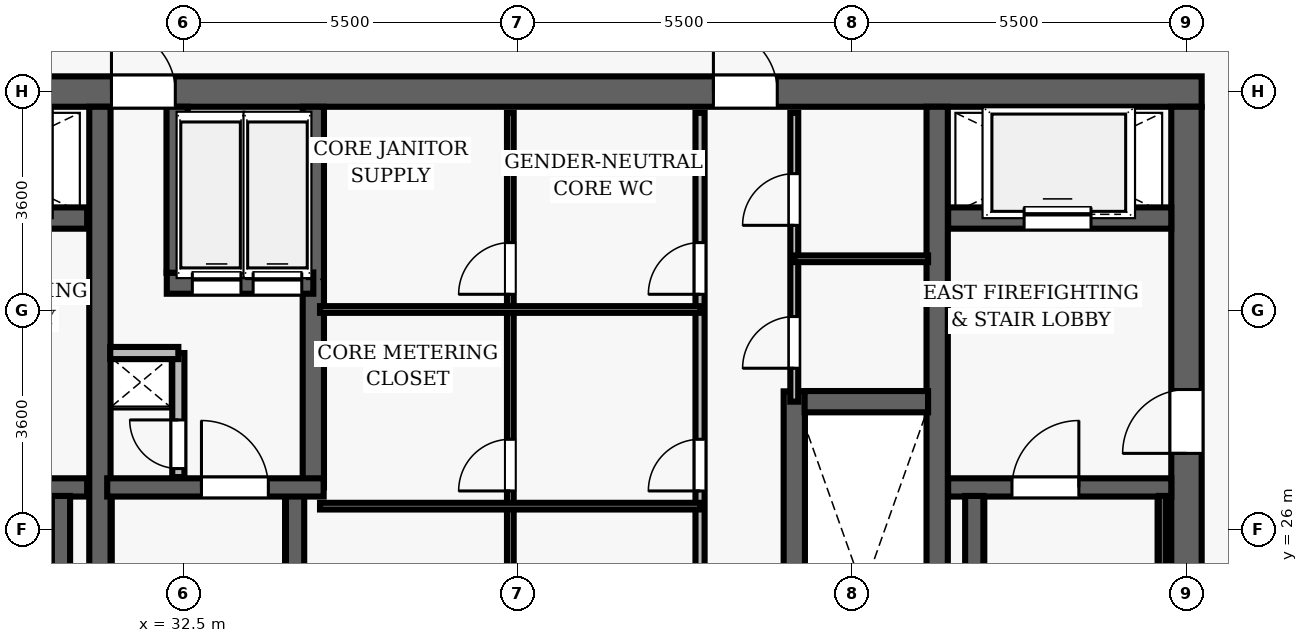
"""IFC4 building model, lengths in metres.
Left out: names, types, materials, properties, quantities, classifications, styles, units other than length and angle.
Written with IfcOpenShell. Run it as: python <this file> out.ifc"""

import sys

from ifc_helpers import new_model, si_unit, direction, frame, frame_2d, origin, place, context, subcontext, project, spatial, rectangle, extrude, element, fill, save


model = new_model("IFC4")
c1 = context("Model", 3, precision=1e-05, world=origin(), true_north=direction((0.0, 1.0)))
c2 = subcontext(c1, "Body", "Model", "MODEL_VIEW")
j1 = project(units=[si_unit("LENGTHUNIT", "METRE"), si_unit("PLANEANGLEUNIT", "RADIAN")], contexts=[c1])
p1 = place(None, origin())
s1 = spatial("IfcSite", under=j1, at=p1, CompositionType="ELEMENT")
p2 = place(p1, origin())
s2 = spatial("IfcBuilding", under=s1, at=p2, CompositionType="ELEMENT")
p3 = place(p2, frame((0.0, 0.0, 178.9)))
s3 = spatial("IfcBuildingStorey", under=s2, at=p3, CompositionType="ELEMENT", Elevation=178.9)
p4 = place(p3, frame((26.75, 33.2, 0.0), z_axis=(0.0, 0.0, 1.0), x_axis=(1.0, 0.0, 0.0)))
e1 = element("IfcWall", 1, at=p4, inside=s3, PredefinedType="SHEAR", context=c2, shape_type="SweptSolid", body=[
    extrude(rectangle(XDim=22.5, YDim=0.5, at=frame_2d((11.25, 0.0))), origin(), (0.0, 0.0, 1.0), 3.85),
])
p5 = place(p4, frame((4.57, 0.0, 0.0)))
e2 = element("IfcOpeningElement", 2, at=p5, cuts=e1, PredefinedType="OPENING", context=c2, shape_type="SweptSolid", body=[
    extrude(rectangle(XDim=1.05, YDim=2.15, at=frame_2d((0.525, 1.075))), frame((0.0, 0.26, 0.0), z_axis=(0.0, -1.0, 0.0), x_axis=(1.0, 0.0, 0.0)), (0.0, 0.0, 1.0), 0.52),
])
p6 = place(p4, frame((14.47, 0.0, 0.0)))
e3 = element("IfcOpeningElement", 3, at=p6, cuts=e1, PredefinedType="OPENING", context=c2, shape_type="SweptSolid", body=[
    extrude(rectangle(XDim=1.05, YDim=2.15, at=frame_2d((0.525, 1.075))), frame((0.0, 0.26, 0.0), z_axis=(0.0, -1.0, 0.0), x_axis=(1.0, 0.0, 0.0)), (0.0, 0.0, 1.0), 0.52),
])
p7 = place(p3, frame((49.0, 19.05, 0.0), z_axis=(0.0, 0.0, 1.0), x_axis=(0.0, 1.0, 0.0)))
e4 = element("IfcWall", 4, at=p7, inside=s3, PredefinedType="SHEAR", context=c2, shape_type="SweptSolid", body=[
    extrude(rectangle(XDim=13.9, YDim=0.5, at=frame_2d((6.95, 0.0))), origin(), (0.0, 0.0, 1.0), 3.85),
])
p8 = place(p7, frame((8.2, 0.0, 0.0)))
e5 = element("IfcOpeningElement", 5, at=p8, cuts=e4, PredefinedType="OPENING", context=c2, shape_type="SweptSolid", body=[
    extrude(rectangle(XDim=1.05, YDim=2.15, at=frame_2d((0.525, 1.075))), frame((0.0, 0.26, 0.0), z_axis=(0.0, -1.0, 0.0), x_axis=(1.0, 0.0, 0.0)), (0.0, 0.0, 1.0), 0.52),
])
for number, where, z_axis, x_axis in (
    (6, (31.13, 19.05, 0.0), (0.0, 0.0, 1.0), (0.0, 1.0, 0.0)),
    (7, (44.9, 19.05, 0.0), (0.0, 0.0, 1.0), (0.0, 1.0, 0.0)),
):
    element("IfcWall", number, at=place(p3, frame(where, z_axis=z_axis, x_axis=x_axis)), inside=s3, PredefinedType="SHEAR", context=c2, shape_type="SweptSolid", body=[
        extrude(rectangle(XDim=13.9, YDim=0.35, at=frame_2d((6.95, 0.0))), origin(), (0.0, 0.0, 1.0), 3.85),
    ])
p9 = place(p3, frame((27.25, 26.69, 0.0), z_axis=(0.0, 0.0, 1.0), x_axis=(1.0, 0.0, 0.0)))
e8 = element("IfcWall", 8, at=p9, inside=s3, PredefinedType="SHEAR", context=c2, shape_type="SweptSolid", body=[
    extrude(rectangle(XDim=3.67, YDim=0.3, at=frame_2d((1.835, 0.0))), origin(), (0.0, 0.0, 1.0), 3.85),
])
p10 = place(p9, frame((1.05, 0.0, 0.0)))
e9 = element("IfcOpeningElement", 9, at=p10, cuts=e8, PredefinedType="OPENING", context=c2, shape_type="SweptSolid", body=[
    extrude(rectangle(XDim=1.1, YDim=2.15, at=frame_2d((0.55, 1.075))), frame((0.0, 0.16, 0.0), z_axis=(0.0, -1.0, 0.0), x_axis=(1.0, 0.0, 0.0)), (0.0, 0.0, 1.0), 0.32),
])
p11 = place(p3, frame((30.49, 19.05, 0.0), z_axis=(0.0, 0.0, 1.0), x_axis=(0.0, 1.0, 0.0)))
e10 = element("IfcWall", 10, at=p11, inside=s3, PredefinedType="SHEAR", context=c2, shape_type="SweptSolid", body=[
    extrude(rectangle(XDim=7.5, YDim=0.3, at=frame_2d((3.75, 0.0))), origin(), (0.0, 0.0, 1.0), 3.85),
])
p12 = place(p3, frame((27.25, 31.12, 0.0), z_axis=(0.0, 0.0, 1.0), x_axis=(1.0, 0.0, 0.0)))
e11 = element("IfcWall", 11, at=p12, inside=s3, PredefinedType="SHEAR", context=c2, shape_type="SweptSolid", body=[
    extrude(rectangle(XDim=3.67, YDim=0.35, at=frame_2d((1.835, 0.0))), origin(), (0.0, 0.0, 1.0), 3.035),
])
p13 = place(p12, frame((1.25, 0.0, 0.0)))
e12 = element("IfcOpeningElement", 12, at=p13, cuts=e11, PredefinedType="OPENING", context=c2, shape_type="SweptSolid", body=[
    extrude(rectangle(XDim=1.1, YDim=2.15, at=frame_2d((0.55, 1.075))), frame((0.0, 0.185, 0.0), z_axis=(0.0, -1.0, 0.0), x_axis=(1.0, 0.0, 0.0)), (0.0, 0.0, 1.0), 0.37),
])
p14 = place(p3, frame((45.08, 26.69, 0.0), z_axis=(0.0, 0.0, 1.0), x_axis=(1.0, 0.0, 0.0)))
e13 = element("IfcWall", 13, at=p14, inside=s3, PredefinedType="SHEAR", context=c2, shape_type="SweptSolid", body=[
    extrude(rectangle(XDim=3.67, YDim=0.3, at=frame_2d((1.835, 0.0))), origin(), (0.0, 0.0, 1.0), 3.85),
])
p15 = place(p14, frame((1.05, 0.0, 0.0)))
e14 = element("IfcOpeningElement", 14, at=p15, cuts=e13, PredefinedType="OPENING", context=c2, shape_type="SweptSolid", body=[
    extrude(rectangle(XDim=1.1, YDim=2.15, at=frame_2d((0.55, 1.075))), frame((0.0, 0.16, 0.0), z_axis=(0.0, -1.0, 0.0), x_axis=(1.0, 0.0, 0.0)), (0.0, 0.0, 1.0), 0.32),
])
p16 = place(p3, frame((45.51, 19.05, 0.0), z_axis=(0.0, 0.0, 1.0), x_axis=(0.0, 1.0, 0.0)))
e15 = element("IfcWall", 15, at=p16, inside=s3, PredefinedType="SHEAR", context=c2, shape_type="SweptSolid", body=[
    extrude(rectangle(XDim=7.5, YDim=0.3, at=frame_2d((3.75, 0.0))), origin(), (0.0, 0.0, 1.0), 3.85),
])
p17 = place(p3, frame((48.605, 19.1, 0.0), z_axis=(0.0, 0.0, 1.0), x_axis=(0.0, 1.0, 0.0)))
e16 = element("IfcWall", 16, at=p17, inside=s3, PredefinedType="SHEAR", context=c2, shape_type="SweptSolid", body=[
    extrude(rectangle(XDim=7.45, YDim=0.12, at=frame_2d((3.725, 0.0))), origin(), (0.0, 0.0, 1.0), 3.85),
])
p18 = place(p3, frame((45.08, 31.12, 0.0), z_axis=(0.0, 0.0, 1.0), x_axis=(1.0, 0.0, 0.0)))
e17 = element("IfcWall", 17, at=p18, inside=s3, PredefinedType="SHEAR", context=c2, shape_type="SweptSolid", body=[
    extrude(rectangle(XDim=3.67, YDim=0.35, at=frame_2d((1.835, 0.0))), origin(), (0.0, 0.0, 1.0), 3.035),
])
p19 = place(p18, frame((1.25, 0.0, 0.0)))
e18 = element("IfcOpeningElement", 18, at=p19, cuts=e17, PredefinedType="OPENING", context=c2, shape_type="SweptSolid", body=[
    extrude(rectangle(XDim=1.1, YDim=2.15, at=frame_2d((0.55, 1.075))), frame((0.0, 0.185, 0.0), z_axis=(0.0, -1.0, 0.0), x_axis=(1.0, 0.0, 0.0)), (0.0, 0.0, 1.0), 0.37),
])
p20 = place(p3, frame((34.34, 19.05, 0.0), z_axis=(0.0, 0.0, 1.0), x_axis=(0.0, 1.0, 0.0)))
e19 = element("IfcWall", 19, at=p20, inside=s3, PredefinedType="SHEAR", context=c2, shape_type="SweptSolid", body=[
    extrude(rectangle(XDim=7.5, YDim=0.3, at=frame_2d((3.75, 0.0))), origin(), (0.0, 0.0, 1.0), 3.85),
])
p21 = place(p3, frame((34.64, 26.69, 0.0), z_axis=(0.0, 0.0, 1.0), x_axis=(0.0, 1.0, 0.0)))
e20 = element("IfcWall", 20, at=p21, inside=s3, PredefinedType="SHEAR", context=c2, shape_type="SweptSolid", body=[
    extrude(rectangle(XDim=6.26, YDim=0.35, at=frame_2d((3.13, 0.0))), origin(), (0.0, 0.0, 1.0), 3.85),
])
p22 = place(p3, frame((31.25, 26.69, 0.0), z_axis=(0.0, 0.0, 1.0), x_axis=(1.0, 0.0, 0.0)))
e21 = element("IfcWall", 21, at=p22, inside=s3, PredefinedType="SHEAR", context=c2, shape_type="SweptSolid", body=[
    extrude(rectangle(XDim=3.56, YDim=0.3, at=frame_2d((1.78, 0.0))), origin(), (0.0, 0.0, 1.0), 3.85),
])
p23 = place(p22, frame((1.55, 0.0, 0.0)))
e22 = element("IfcOpeningElement", 22, at=p23, cuts=e21, PredefinedType="OPENING", context=c2, shape_type="SweptSolid", body=[
    extrude(rectangle(XDim=1.1, YDim=2.15, at=frame_2d((0.55, 1.075))), frame((0.0, 0.16, 0.0), z_axis=(0.0, -1.0, 0.0), x_axis=(1.0, 0.0, 0.0)), (0.0, 0.0, 1.0), 0.32),
])
p24 = place(p3, frame((32.23, 30.05, 0.0), z_axis=(0.0, 0.0, 1.0), x_axis=(1.0, 0.0, 0.0)))
e23 = element("IfcWall", 23, at=p24, inside=s3, PredefinedType="SHEAR", context=c2, shape_type="SweptSolid", body=[
    extrude(rectangle(XDim=2.41, YDim=0.35, at=frame_2d((1.205, 0.0))), origin(), (0.0, 0.0, 1.0), 3.035),
])
p25 = place(p24, frame((0.42, 0.0, 0.0)))
e24 = element("IfcOpeningElement", 24, at=p25, cuts=e23, PredefinedType="OPENING", context=c2, shape_type="SweptSolid", body=[
    extrude(rectangle(XDim=0.8, YDim=2.15, at=frame_2d((0.4, 1.075))), frame((0.0, 0.185, 0.0), z_axis=(0.0, -1.0, 0.0), x_axis=(1.0, 0.0, 0.0)), (0.0, 0.0, 1.0), 0.37),
])
p26 = place(p24, frame((1.42, 0.0, 0.0)))
e25 = element("IfcOpeningElement", 25, at=p26, cuts=e23, PredefinedType="OPENING", context=c2, shape_type="SweptSolid", body=[
    extrude(rectangle(XDim=0.8, YDim=2.15, at=frame_2d((0.4, 1.075))), frame((0.0, 0.185, 0.0), z_axis=(0.0, -1.0, 0.0), x_axis=(1.0, 0.0, 0.0)), (0.0, 0.0, 1.0), 0.37),
])
p27 = place(p3, frame((32.4, 30.22, 0.0), z_axis=(0.0, 0.0, 1.0), x_axis=(0.0, 1.0, 0.0)))
e26 = element("IfcWall", 26, at=p27, inside=s3, PredefinedType="SHEAR", context=c2, shape_type="SweptSolid", body=[
    extrude(rectangle(XDim=2.73, YDim=0.35, at=frame_2d((1.365, 0.0))), origin(), (0.0, 0.0, 1.0), 3.035),
])
p28 = place(p3, frame((32.42, 26.86, 0.0), z_axis=(0.0, 0.0, 1.0), x_axis=(0.0, 1.0, 0.0)))
e27 = element("IfcWall", 27, at=p28, inside=s3, PredefinedType="PARTITIONING", context=c2, shape_type="SweptSolid", body=[
    extrude(rectangle(XDim=2.04, YDim=0.2, at=frame_2d((1.02, 0.0))), origin(), (0.0, 0.0, 1.0), 3.035),
])
p29 = place(p28, frame((0.14, 0.0, 0.0)))
e28 = element("IfcOpeningElement", 28, at=p29, cuts=e27, PredefinedType="OPENING", context=c2, shape_type="SweptSolid", body=[
    extrude(rectangle(XDim=0.8, YDim=2.05, at=frame_2d((0.4, 1.025))), frame((0.0, 0.11, 0.0), z_axis=(0.0, -1.0, 0.0), x_axis=(1.0, 0.0, 0.0)), (0.0, 0.0, 1.0), 0.22),
])
p30 = place(p3, frame((31.3, 28.9, 0.0), z_axis=(0.0, 0.0, 1.0), x_axis=(1.0, 0.0, 0.0)))
e29 = element("IfcWall", 29, at=p30, inside=s3, PredefinedType="PARTITIONING", context=c2, shape_type="SweptSolid", body=[
    extrude(rectangle(XDim=1.12, YDim=0.2, at=frame_2d((0.56, 0.0))), origin(), (0.0, 0.0, 1.0), 3.035),
])
p31 = place(p3, frame((42.55, 21.73, 0.0), z_axis=(0.0, 0.0, 1.0), x_axis=(0.0, 1.0, 0.0)))
e30 = element("IfcWall", 30, at=p31, inside=s3, PredefinedType="SHEAR", context=c2, shape_type="SweptSolid", body=[
    extrude(rectangle(XDim=6.54, YDim=0.35, at=frame_2d((3.27, 0.0))), origin(), (0.0, 0.0, 1.0), 3.035),
])
p32 = place(p3, frame((42.72, 28.1, 0.0), z_axis=(0.0, 0.0, 1.0), x_axis=(1.0, 0.0, 0.0)))
e31 = element("IfcWall", 31, at=p32, inside=s3, PredefinedType="SHEAR", context=c2, shape_type="SweptSolid", body=[
    extrude(rectangle(XDim=2.03, YDim=0.35, at=frame_2d((1.015, 0.0))), origin(), (0.0, 0.0, 1.0), 3.035),
])
p33 = place(p3, frame((41.0, 23.05, 0.0), z_axis=(0.0, 0.0, 1.0), x_axis=(0.0, 1.0, 0.0)))
e32 = element("IfcWall", 32, at=p33, inside=s3, PredefinedType="PARTITIONING", context=c2, shape_type="SweptSolid", body=[
    extrude(rectangle(XDim=9.8, YDim=0.15, at=frame_2d((4.9, 0.0))), origin(), (0.0, 0.0, 1.0), 3.035),
])
p34 = place(p33, frame((0.25, 0.0, 0.0)))
e33 = element("IfcOpeningElement", 33, at=p34, cuts=e32, PredefinedType="OPENING", context=c2, shape_type="SweptSolid", body=[
    extrude(rectangle(XDim=0.85, YDim=2.1, at=frame_2d((0.425, 1.05))), frame((0.0, 0.085, 0.0), z_axis=(0.0, -1.0, 0.0), x_axis=(1.0, 0.0, 0.0)), (0.0, 0.0, 1.0), 0.17),
])
p35 = place(p33, frame((3.582, 0.0, 0.0)))
e34 = element("IfcOpeningElement", 34, at=p35, cuts=e32, PredefinedType="OPENING", context=c2, shape_type="SweptSolid", body=[
    extrude(rectangle(XDim=0.85, YDim=2.1, at=frame_2d((0.425, 1.05))), frame((0.0, 0.085, 0.0), z_axis=(0.0, -1.0, 0.0), x_axis=(1.0, 0.0, 0.0)), (0.0, 0.0, 1.0), 0.17),
])
p36 = place(p33, frame((6.816, 0.0, 0.0)))
e35 = element("IfcOpeningElement", 35, at=p36, cuts=e32, PredefinedType="OPENING", context=c2, shape_type="SweptSolid", body=[
    extrude(rectangle(XDim=0.85, YDim=2.1, at=frame_2d((0.425, 1.05))), frame((0.0, 0.085, 0.0), z_axis=(0.0, -1.0, 0.0), x_axis=(1.0, 0.0, 0.0)), (0.0, 0.0, 1.0), 0.17),
])
p37 = place(p3, frame((37.88, 23.05, 0.0), z_axis=(0.0, 0.0, 1.0), x_axis=(0.0, 1.0, 0.0)))
e36 = element("IfcWall", 36, at=p37, inside=s3, PredefinedType="PARTITIONING", context=c2, shape_type="SweptSolid", body=[
    extrude(rectangle(XDim=9.8, YDim=0.11, at=frame_2d((4.9, 0.0))), origin(), (0.0, 0.0, 1.0), 3.035),
])
p38 = place(p37, frame((0.25, 0.0, 0.0)))
e37 = element("IfcOpeningElement", 37, at=p38, cuts=e36, PredefinedType="OPENING", context=c2, shape_type="SweptSolid", body=[
    extrude(rectangle(XDim=0.85, YDim=2.1, at=frame_2d((0.425, 1.05))), frame((0.0, 0.065, 0.0), z_axis=(0.0, -1.0, 0.0), x_axis=(1.0, 0.0, 0.0)), (0.0, 0.0, 1.0), 0.13),
])
p39 = place(p37, frame((3.582, 0.0, 0.0)))
e38 = element("IfcOpeningElement", 38, at=p39, cuts=e36, PredefinedType="OPENING", context=c2, shape_type="SweptSolid", body=[
    extrude(rectangle(XDim=0.85, YDim=2.1, at=frame_2d((0.425, 1.05))), frame((0.0, 0.065, 0.0), z_axis=(0.0, -1.0, 0.0), x_axis=(1.0, 0.0, 0.0)), (0.0, 0.0, 1.0), 0.13),
])
p40 = place(p37, frame((6.816, 0.0, 0.0)))
e39 = element("IfcOpeningElement", 39, at=p40, cuts=e36, PredefinedType="OPENING", context=c2, shape_type="SweptSolid", body=[
    extrude(rectangle(XDim=0.85, YDim=2.1, at=frame_2d((0.425, 1.05))), frame((0.0, 0.065, 0.0), z_axis=(0.0, -1.0, 0.0), x_axis=(1.0, 0.0, 0.0)), (0.0, 0.0, 1.0), 0.13),
])
for number, where, z_axis, x_axis in (
    (40, (34.75, 26.382, 0.0), (0.0, 0.0, 1.0), (1.0, 0.0, 0.0)),
    (41, (34.75, 29.616, 0.0), (0.0, 0.0, 1.0), (1.0, 0.0, 0.0)),
):
    element("IfcWall", number, at=place(p3, frame(where, z_axis=z_axis, x_axis=x_axis)), inside=s3, PredefinedType="PARTITIONING", context=c2, shape_type="SweptSolid", body=[
        extrude(rectangle(XDim=6.25, YDim=0.11, at=frame_2d((3.125, 0.0))), origin(), (0.0, 0.0, 1.0), 3.035),
    ])
p41 = place(p3, frame((42.55, 28.1, 0.0), z_axis=(0.0, 0.0, 1.0), x_axis=(0.0, 1.0, 0.0)))
e42 = element("IfcWall", 42, at=p41, inside=s3, PredefinedType="PARTITIONING", context=c2, shape_type="SweptSolid", body=[
    extrude(rectangle(XDim=4.75, YDim=0.13, at=frame_2d((2.375, 0.0))), origin(), (0.0, 0.0, 1.0), 3.035),
])
p42 = place(p41, frame((0.55, 0.0, 0.0)))
e43 = element("IfcOpeningElement", 43, at=p42, cuts=e42, PredefinedType="OPENING", context=c2, shape_type="SweptSolid", body=[
    extrude(rectangle(XDim=0.85, YDim=2.1, at=frame_2d((0.425, 1.05))), frame((0.0, 0.075, 0.0), z_axis=(0.0, -1.0, 0.0), x_axis=(1.0, 0.0, 0.0)), (0.0, 0.0, 1.0), 0.15),
])
p43 = place(p41, frame((2.9, 0.0, 0.0)))
e44 = element("IfcOpeningElement", 44, at=p43, cuts=e42, PredefinedType="OPENING", context=c2, shape_type="SweptSolid", body=[
    extrude(rectangle(XDim=0.85, YDim=2.1, at=frame_2d((0.425, 1.05))), frame((0.0, 0.075, 0.0), z_axis=(0.0, -1.0, 0.0), x_axis=(1.0, 0.0, 0.0)), (0.0, 0.0, 1.0), 0.15),
])
p44 = place(p3, frame((42.55, 30.45, 0.0), z_axis=(0.0, 0.0, 1.0), x_axis=(1.0, 0.0, 0.0)))
e45 = element("IfcWall", 45, at=p44, inside=s3, PredefinedType="PARTITIONING", context=c2, shape_type="SweptSolid", body=[
    extrude(rectangle(XDim=2.2, YDim=0.11, at=frame_2d((1.1, 0.0))), origin(), (0.0, 0.0, 1.0), 3.035),
])
p45 = place(p15, origin())
e46 = element("IfcDoor", 46, at=p45, inside=s3, OperationType="SINGLE_SWING_RIGHT", PredefinedType="DOOR", context=c2, shape_type="SweptSolid", body=[
    extrude(rectangle(XDim=1.1, YDim=2.15, at=frame_2d((0.55, 1.075))), frame((0.0, 0.025, 0.0), z_axis=(0.0, -1.0, 0.0), x_axis=(1.0, 0.0, 0.0)), (0.0, 0.0, 1.0), 0.05),
])
fill(e14, e46)
p46 = place(p8, origin())
e47 = element("IfcDoor", 47, at=p46, inside=s3, OperationType="SINGLE_SWING_LEFT", PredefinedType="DOOR", context=c2, shape_type="SweptSolid", body=[
    extrude(rectangle(XDim=1.05, YDim=2.15, at=frame_2d((0.525, 1.075))), frame((0.0, 0.025, 0.0), z_axis=(0.0, -1.0, 0.0), x_axis=(1.0, 0.0, 0.0)), (0.0, 0.0, 1.0), 0.05),
])
fill(e5, e47)
p47 = place(p23, origin())
e48 = element("IfcDoor", 48, at=p47, inside=s3, OperationType="SINGLE_SWING_LEFT", PredefinedType="DOOR", context=c2, shape_type="SweptSolid", body=[
    extrude(rectangle(XDim=1.1, YDim=2.15, at=frame_2d((0.55, 1.075))), frame((0.0, 0.025, 0.0), z_axis=(0.0, -1.0, 0.0), x_axis=(1.0, 0.0, 0.0)), (0.0, 0.0, 1.0), 0.05),
])
fill(e22, e48)
p48 = place(p29, origin())
e49 = element("IfcDoor", 49, at=p48, inside=s3, OperationType="SINGLE_SWING_RIGHT", PredefinedType="DOOR", context=c2, shape_type="SweptSolid", body=[
    extrude(rectangle(XDim=0.8, YDim=2.05, at=frame_2d((0.4, 1.025))), frame((0.0, 0.025, 0.0), z_axis=(0.0, -1.0, 0.0), x_axis=(1.0, 0.0, 0.0)), (0.0, 0.0, 1.0), 0.05),
])
fill(e28, e49)
p49 = place(p5, origin())
e50 = element("IfcDoor", 50, at=p49, inside=s3, OperationType="SINGLE_SWING_LEFT", PredefinedType="DOOR", context=c2, shape_type="SweptSolid", body=[
    extrude(rectangle(XDim=1.05, YDim=2.15, at=frame_2d((0.525, 1.075))), frame((0.0, 0.025, 0.0), z_axis=(0.0, -1.0, 0.0), x_axis=(1.0, 0.0, 0.0)), (0.0, 0.0, 1.0), 0.05),
])
fill(e2, e50)
p50 = place(p6, origin())
e51 = element("IfcDoor", 51, at=p50, inside=s3, OperationType="SINGLE_SWING_LEFT", PredefinedType="DOOR", context=c2, shape_type="SweptSolid", body=[
    extrude(rectangle(XDim=1.05, YDim=2.15, at=frame_2d((0.525, 1.075))), frame((0.0, 0.025, 0.0), z_axis=(0.0, -1.0, 0.0), x_axis=(1.0, 0.0, 0.0)), (0.0, 0.0, 1.0), 0.05),
])
fill(e3, e51)
p51 = place(p35, origin())
e52 = element("IfcDoor", 52, at=p51, inside=s3, OperationType="SINGLE_SWING_LEFT", PredefinedType="DOOR", context=c2, shape_type="SweptSolid", body=[
    extrude(rectangle(XDim=0.85, YDim=2.1, at=frame_2d((0.425, 1.05))), frame((0.0, 0.025, 0.0), z_axis=(0.0, -1.0, 0.0), x_axis=(1.0, 0.0, 0.0)), (0.0, 0.0, 1.0), 0.05),
])
fill(e34, e52)
p52 = place(p39, origin())
e53 = element("IfcDoor", 53, at=p52, inside=s3, OperationType="SINGLE_SWING_LEFT", PredefinedType="DOOR", context=c2, shape_type="SweptSolid", body=[
    extrude(rectangle(XDim=0.85, YDim=2.1, at=frame_2d((0.425, 1.05))), frame((0.0, 0.025, 0.0), z_axis=(0.0, -1.0, 0.0), x_axis=(1.0, 0.0, 0.0)), (0.0, 0.0, 1.0), 0.05),
])
fill(e38, e53)
p53 = place(p36, origin())
e54 = element("IfcDoor", 54, at=p53, inside=s3, OperationType="SINGLE_SWING_LEFT", PredefinedType="DOOR", context=c2, shape_type="SweptSolid", body=[
    extrude(rectangle(XDim=0.85, YDim=2.1, at=frame_2d((0.425, 1.05))), frame((0.0, 0.025, 0.0), z_axis=(0.0, -1.0, 0.0), x_axis=(1.0, 0.0, 0.0)), (0.0, 0.0, 1.0), 0.05),
])
fill(e35, e54)
p54 = place(p40, origin())
e55 = element("IfcDoor", 55, at=p54, inside=s3, OperationType="SINGLE_SWING_LEFT", PredefinedType="DOOR", context=c2, shape_type="SweptSolid", body=[
    extrude(rectangle(XDim=0.85, YDim=2.1, at=frame_2d((0.425, 1.05))), frame((0.0, 0.025, 0.0), z_axis=(0.0, -1.0, 0.0), x_axis=(1.0, 0.0, 0.0)), (0.0, 0.0, 1.0), 0.05),
])
fill(e39, e55)
p55 = place(p42, origin())
e56 = element("IfcDoor", 56, at=p55, inside=s3, OperationType="SINGLE_SWING_LEFT", PredefinedType="DOOR", context=c2, shape_type="SweptSolid", body=[
    extrude(rectangle(XDim=0.85, YDim=2.1, at=frame_2d((0.425, 1.05))), frame((0.0, 0.025, 0.0), z_axis=(0.0, -1.0, 0.0), x_axis=(1.0, 0.0, 0.0)), (0.0, 0.0, 1.0), 0.05),
])
fill(e43, e56)
p56 = place(p43, origin())
e57 = element("IfcDoor", 57, at=p56, inside=s3, OperationType="SINGLE_SWING_LEFT", PredefinedType="DOOR", context=c2, shape_type="SweptSolid", body=[
    extrude(rectangle(XDim=0.85, YDim=2.1, at=frame_2d((0.425, 1.05))), frame((0.0, 0.025, 0.0), z_axis=(0.0, -1.0, 0.0), x_axis=(1.0, 0.0, 0.0)), (0.0, 0.0, 1.0), 0.05),
])
fill(e44, e57)
p57 = place(p19, origin())
e58 = element("IfcDoor", 58, at=p57, inside=s3, OperationType="SLIDING_TO_LEFT", PredefinedType="DOOR", context=c2, shape_type="SweptSolid", body=[
    extrude(rectangle(XDim=1.1, YDim=2.15, at=frame_2d((0.55, 1.075))), frame((0.0, 0.025, 0.0), z_axis=(0.0, -1.0, 0.0), x_axis=(1.0, 0.0, 0.0)), (0.0, 0.0, 1.0), 0.05),
])
fill(e18, e58)
p58 = place(p25, origin())
e59 = element("IfcDoor", 59, at=p58, inside=s3, OperationType="SLIDING_TO_LEFT", PredefinedType="DOOR", context=c2, shape_type="SweptSolid", body=[
    extrude(rectangle(XDim=0.8, YDim=2.15, at=frame_2d((0.4, 1.075))), frame((0.0, 0.025, 0.0), z_axis=(0.0, -1.0, 0.0), x_axis=(1.0, 0.0, 0.0)), (0.0, 0.0, 1.0), 0.05),
])
fill(e24, e59)
p59 = place(p26, origin())
e60 = element("IfcDoor", 60, at=p59, inside=s3, OperationType="SLIDING_TO_LEFT", PredefinedType="DOOR", context=c2, shape_type="SweptSolid", body=[
    extrude(rectangle(XDim=0.8, YDim=2.15, at=frame_2d((0.4, 1.075))), frame((0.0, 0.025, 0.0), z_axis=(0.0, -1.0, 0.0), x_axis=(1.0, 0.0, 0.0)), (0.0, 0.0, 1.0), 0.05),
])
fill(e25, e60)
save(model, sys.argv[1])
